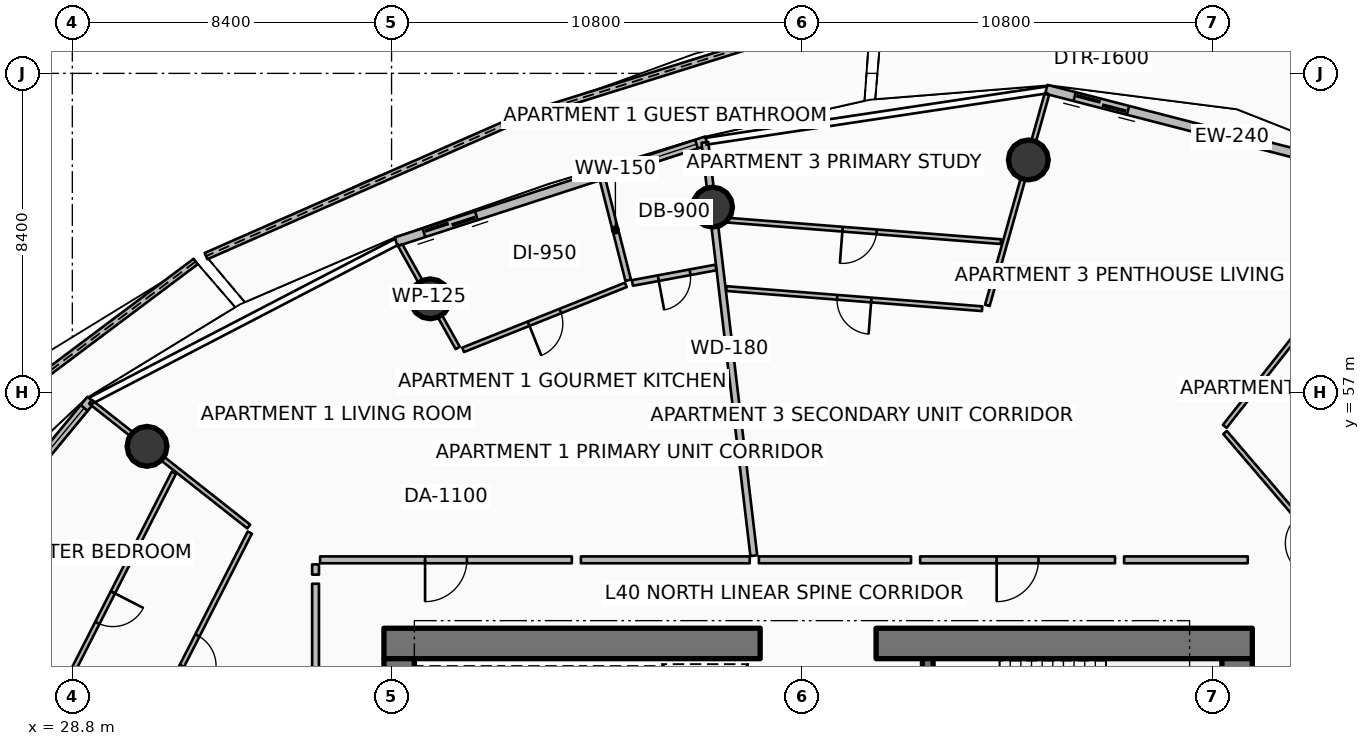
"""IFC4 building model, lengths in metres.
Left out: names, types, materials, properties, quantities, classifications, styles, units other than length and angle.
Written with IfcOpenShell. Run it as: python <this file> out.ifc"""

import sys

from ifc_helpers import new_model, si_unit, direction, frame, frame_2d, origin, origin_2d, place, context, subcontext, project, spatial, polyline, rectangle, circle, outline, extrude, element, fill, save


model = new_model("IFC4")
c1 = context("Model", 3, precision=1e-05, world=origin(), true_north=direction((0.0, 1.0)))
c2 = subcontext(c1, "Body", "Model", "MODEL_VIEW")
j1 = project(units=[si_unit("LENGTHUNIT", "METRE"), si_unit("PLANEANGLEUNIT", "RADIAN")], contexts=[c1])
p1 = place(None, origin())
s1 = spatial("IfcSite", under=j1, at=p1, CompositionType="ELEMENT")
p2 = place(p1, origin())
s2 = spatial("IfcBuilding", under=s1, at=p2, CompositionType="ELEMENT")
p3 = place(p2, frame((0.0, 0.0, 161.55)))
s3 = spatial("IfcBuildingStorey", under=s2, at=p3, CompositionType="ELEMENT", Elevation=161.55)
p4 = place(p3, frame((37.0, 50.4, 0.0), z_axis=(0.0, 0.0, 1.0), x_axis=(1.0, 0.0, 0.0)))
e1 = element("IfcWall", 1, at=p4, inside=s3, PredefinedType="SHEAR", context=c2, shape_type="SweptSolid", body=[
    extrude(rectangle(XDim=9.9, YDim=0.8, at=frame_2d((4.95, 0.0))), origin(), (0.0, 0.0, 1.0), 3.75),
])
p5 = place(p3, frame((49.95, 50.4, 0.0), z_axis=(0.0, 0.0, 1.0), x_axis=(1.0, 0.0, 0.0)))
e2 = element("IfcWall", 2, at=p5, inside=s3, PredefinedType="SHEAR", context=c2, shape_type="SweptSolid", body=[
    extrude(rectangle(XDim=9.9, YDim=0.8, at=frame_2d((4.95, 0.0))), origin(), (0.0, 0.0, 1.0), 3.75),
])
for number, where, z_axis, x_axis in (
    (3, (37.4, 34.0, 0.0), (0.0, 0.0, 1.0), (0.0, 1.0, 0.0)),
    (4, (59.45, 34.0, 0.0), (0.0, 0.0, 1.0), (0.0, 1.0, 0.0)),
):
    element("IfcWall", number, at=place(p3, frame(where, z_axis=z_axis, x_axis=x_axis)), inside=s3, PredefinedType="SHEAR", context=c2, shape_type="SweptSolid", body=[
        extrude(rectangle(XDim=16.0, YDim=0.8, at=frame_2d((8.0, 0.0))), origin(), (0.0, 0.0, 1.0), 3.75),
    ])
p6 = place(p3, frame((51.31, 46.5, 0.0), z_axis=(0.0, 0.0, 1.0), x_axis=(0.0, 1.0, 0.0)))
e5 = element("IfcWall", 5, at=p6, inside=s3, PredefinedType="SHEAR", context=c2, shape_type="SweptSolid", body=[
    extrude(rectangle(XDim=3.5, YDim=0.28, at=frame_2d((1.75, 0.0))), origin(), (0.0, 0.0, 1.0), 3.75),
])
for number, where, z_axis, x_axis in (
    (6, (53.957, 63.122, 0.0), (0.0, 0.0, 1.0), (1.0, 0.0, 0.0)),
    (7, (45.647, 61.881, 0.0), (0.0, 0.0, 1.0), (1.0, 0.0, 0.0)),
    (8, (38.218, 59.467, 0.0), (0.0, 0.0, 1.0), (1.0, 0.0, 0.0)),
    (9, (30.766, 55.586, 0.0), (0.0, 0.0, 1.0), (1.0, 0.0, 0.0)),
):
    element("IfcColumn", number, at=place(p3, frame(where, z_axis=z_axis, x_axis=x_axis)), inside=s3, PredefinedType="COLUMN", context=c2, shape_type="SweptSolid", body=[
        extrude(circle(Radius=0.525, at=origin_2d()), origin(), (0.0, 0.0, 1.0), 3.5),
    ])
p7 = place(p3, frame((69.904, 60.94, 0.0), z_axis=(0.0, 0.0, 1.0), x_axis=(-0.847688171498, 0.53049482929, 0.0)))
e10 = element("IfcWall", 10, at=p7, inside=s3, PredefinedType="PARAPET", context=c2, shape_type="SweptSolid", body=[
    extrude(outline(polyline([(0.0, 0.0), (10.84, 0.0), (10.84, 1.832), (5.42, 1.696), (0.0, 1.497), (0.0, 0.0)])), frame((0.0, 0.09, 0.0), z_axis=(0.0, -1.0, 0.0), x_axis=(1.0, 0.0, 0.0)), (0.0, 0.0, 1.0), 0.18),
])
p8 = place(p3, frame((49.824, 67.137, 0.0), z_axis=(0.0, 0.0, 1.0), x_axis=(-0.954421625817, -0.298461656119, 0.0)))
e11 = element("IfcWall", 11, at=p8, inside=s3, PredefinedType="PARAPET", context=c2, shape_type="SweptSolid", body=[
    extrude(outline(polyline([(0.0, 0.0), (9.383, 0.0), (9.383, 1.348), (4.691, 1.562), (0.0, 1.747), (0.0, 0.0)])), frame((0.0, 0.09, 0.0), z_axis=(0.0, -1.0, 0.0), x_axis=(1.0, 0.0, 0.0)), (0.0, 0.0, 1.0), 0.18),
])
p9 = place(p3, frame((40.644, 64.253, 0.0), z_axis=(0.0, 0.0, 1.0), x_axis=(-0.915409194146, -0.402524542448, 0.0)))
e12 = element("IfcWall", 12, at=p9, inside=s3, PredefinedType="PARAPET", context=c2, shape_type="SweptSolid", body=[
    extrude(outline(polyline([(0.0, 0.0), (9.097, 0.0), (9.097, 1.12), (4.548, 1.182), (0.0, 1.348), (0.0, 0.0)])), frame((0.0, 0.09, 0.0), z_axis=(0.0, -1.0, 0.0), x_axis=(1.0, 0.0, 0.0)), (0.0, 0.0, 1.0), 0.18),
])
p10 = place(p3, frame((32.046, 60.45, 0.0), z_axis=(0.0, 0.0, 1.0), x_axis=(-0.800078127259, -0.599895816189, 0.0)))
e13 = element("IfcWall", 13, at=p10, inside=s3, PredefinedType="PARAPET", context=c2, shape_type="SweptSolid", body=[
    extrude(outline(polyline([(0.0, 0.0), (10.124, 0.0), (10.124, 1.348), (5.062, 1.182), (0.0, 1.12), (0.0, 0.0)])), frame((0.0, 0.09, 0.0), z_axis=(0.0, -1.0, 0.0), x_axis=(1.0, 0.0, 0.0)), (0.0, 0.0, 1.0), 0.18),
])
p11 = place(p3, frame((64.192, 62.466, 0.0), z_axis=(0.0, 0.0, 1.0), x_axis=(-0.968379685126, 0.249481032214, 0.0)))
e14 = element("IfcWall", 14, at=p11, inside=s3, PredefinedType="SOLIDWALL", context=c2, shape_type="SweptSolid", body=[
    extrude(rectangle(XDim=10.082, YDim=0.24, at=frame_2d((5.041, 0.0))), origin(), (0.0, 0.0, 1.0), 2.45),
])
p12 = place(p11, frame((7.862, 0.0, 0.0)))
e15 = element("IfcOpeningElement", 15, at=p12, cuts=e14, PredefinedType="OPENING", context=c2, shape_type="SweptSolid", body=[
    extrude(rectangle(XDim=1.45, YDim=2.15, at=frame_2d((0.725, 1.075))), frame((0.0, 0.13, 0.0), z_axis=(0.0, -1.0, 0.0), x_axis=(1.0, 0.0, 0.0)), (0.0, 0.0, 1.0), 0.26),
])
p13 = place(p11, frame((0.28, 0.0, 0.65)))
e16 = element("IfcOpeningElement", 16, at=p13, cuts=e14, PredefinedType="OPENING", context=c2, shape_type="SweptSolid", body=[
    extrude(rectangle(XDim=1.6, YDim=1.5, at=frame_2d((0.8, 0.75))), frame((0.0, 0.13, 0.0), z_axis=(0.0, -1.0, 0.0), x_axis=(1.0, 0.0, 0.0)), (0.0, 0.0, 1.0), 0.26),
])
p14 = place(p3, frame((45.49, 63.624, 0.0), z_axis=(0.0, 0.0, 1.0), x_axis=(-0.951046390632, -0.309048156224, 0.0)))
e17 = element("IfcWall", 17, at=p14, inside=s3, PredefinedType="SOLIDWALL", context=c2, shape_type="SweptSolid", body=[
    extrude(rectangle(XDim=8.59, YDim=0.24, at=frame_2d((4.295, 0.0))), origin(), (0.0, 0.0, 1.0), 2.45),
])
p15 = place(p14, frame((6.37, 0.0, 0.0)))
e18 = element("IfcOpeningElement", 18, at=p15, cuts=e17, PredefinedType="OPENING", context=c2, shape_type="SweptSolid", body=[
    extrude(rectangle(XDim=1.45, YDim=2.15, at=frame_2d((0.725, 1.075))), frame((0.0, 0.13, 0.0), z_axis=(0.0, -1.0, 0.0), x_axis=(1.0, 0.0, 0.0)), (0.0, 0.0, 1.0), 0.26),
])
p16 = place(p14, frame((0.28, 0.0, 0.65)))
e19 = element("IfcOpeningElement", 19, at=p16, cuts=e17, PredefinedType="OPENING", context=c2, shape_type="SweptSolid", body=[
    extrude(rectangle(XDim=1.6, YDim=1.5, at=frame_2d((0.8, 0.75))), frame((0.0, 0.13, 0.0), z_axis=(0.0, -1.0, 0.0), x_axis=(1.0, 0.0, 0.0)), (0.0, 0.0, 1.0), 0.26),
])
p17 = place(p3, frame((29.291, 56.813, 0.0), z_axis=(0.0, 0.0, 1.0), x_axis=(-0.636771922292, -0.77105221547, 0.0)))
e20 = element("IfcWall", 20, at=p17, inside=s3, PredefinedType="SOLIDWALL", context=c2, shape_type="SweptSolid", body=[
    extrude(rectangle(XDim=10.082, YDim=0.24, at=frame_2d((5.041, 0.0))), origin(), (0.0, 0.0, 1.0), 2.45),
])
p18 = place(p17, frame((7.862, 0.0, 0.0)))
e21 = element("IfcOpeningElement", 21, at=p18, cuts=e20, PredefinedType="OPENING", context=c2, shape_type="SweptSolid", body=[
    extrude(rectangle(XDim=1.45, YDim=2.15, at=frame_2d((0.725, 1.075))), frame((0.0, 0.13, 0.0), z_axis=(0.0, -1.0, 0.0), x_axis=(1.0, 0.0, 0.0)), (0.0, 0.0, 1.0), 0.26),
])
p19 = place(p17, frame((0.28, 0.0, 0.65)))
e22 = element("IfcOpeningElement", 22, at=p19, cuts=e20, PredefinedType="OPENING", context=c2, shape_type="SweptSolid", body=[
    extrude(rectangle(XDim=1.6, YDim=1.5, at=frame_2d((0.8, 0.75))), frame((0.0, 0.13, 0.0), z_axis=(0.0, -1.0, 0.0), x_axis=(1.0, 0.0, 0.0)), (0.0, 0.0, 1.0), 0.26),
])
p20 = place(p3, frame((46.732, 52.709, 0.0), z_axis=(0.0, 0.0, 1.0), x_axis=(-0.117537145285, 0.993068486802, 0.0)))
e23 = element("IfcWall", 23, at=p20, inside=s3, PredefinedType="PARTITIONING", context=c2, shape_type="SweptSolid", body=[
    extrude(rectangle(XDim=10.951, YDim=0.18, at=frame_2d((5.475, 0.0))), origin(), (0.0, 0.0, 1.0), 2.94),
])
p21 = place(p3, frame((41.944, 52.6, 0.0), z_axis=(0.0, 0.0, 1.0), x_axis=(-1.0, 0.0, 0.0)))
e24 = element("IfcWall", 24, at=p21, inside=s3, PredefinedType="PARTITIONING", context=c2, shape_type="SweptSolid", body=[
    extrude(rectangle(XDim=6.624, YDim=0.18, at=frame_2d((3.312, 0.0))), origin(), (0.0, 0.0, 1.0), 2.94),
])
p22 = place(p21, frame((2.762, 0.0, 0.0)))
e25 = element("IfcOpeningElement", 25, at=p22, cuts=e24, PredefinedType="OPENING", context=c2, shape_type="SweptSolid", body=[
    extrude(rectangle(XDim=1.1, YDim=2.1, at=frame_2d((0.55, 1.05))), frame((0.0, 0.1, 0.0), z_axis=(0.0, -1.0, 0.0), x_axis=(1.0, 0.0, 0.0)), (0.0, 0.0, 1.0), 0.2),
])
p23 = place(p3, frame((35.2, 52.48, 0.0), z_axis=(0.0, 0.0, 1.0), x_axis=(0.0, -1.0, 0.0)))
e26 = element("IfcWall", 26, at=p23, inside=s3, PredefinedType="PARTITIONING", context=c2, shape_type="SweptSolid", body=[
    extrude(rectangle(XDim=0.269, YDim=0.18, at=frame_2d((0.135, 0.0))), origin(), (0.0, 0.0, 1.0), 2.94),
])
p24 = place(p3, frame((46.625, 52.6, 0.0), z_axis=(0.0, 0.0, 1.0), x_axis=(-1.0, 0.0, 0.0)))
e27 = element("IfcWall", 27, at=p24, inside=s3, PredefinedType="PARTITIONING", context=c2, shape_type="SweptSolid", body=[
    extrude(rectangle(XDim=4.442, YDim=0.18, at=frame_2d((2.221, 0.0))), origin(), (0.0, 0.0, 1.0), 2.94),
])
p25 = place(p3, frame((38.941, 58.175, 0.0), z_axis=(0.0, 0.0, 1.0), x_axis=(-0.488620181058, 0.872496600946, 0.0)))
e28 = element("IfcWall", 28, at=p25, inside=s3, PredefinedType="PARTITIONING", context=c2, shape_type="SweptSolid", body=[
    extrude(rectangle(XDim=3.095, YDim=0.125, at=frame_2d((1.548, 0.0))), origin(), (0.0, 0.0, 1.0), 2.94),
])
p26 = place(p3, frame((45.734, 60.293, 0.0), z_axis=(0.0, 0.0, 1.0), x_axis=(-0.983182569162, -0.182625397184, 0.0)))
e29 = element("IfcWall", 29, at=p26, inside=s3, PredefinedType="PARTITIONING", context=c2, shape_type="SweptSolid", body=[
    extrude(rectangle(XDim=2.234, YDim=0.15, at=frame_2d((1.117, 0.0))), origin(), (0.0, 0.0, 1.0), 2.94),
])
p27 = place(p26, frame((0.692, 0.0, 0.0)))
e30 = element("IfcOpeningElement", 30, at=p27, cuts=e29, PredefinedType="OPENING", context=c2, shape_type="SweptSolid", body=[
    extrude(rectangle(XDim=0.85, YDim=2.06, at=frame_2d((0.425, 1.03))), frame((0.0, 0.085, 0.0), z_axis=(0.0, -1.0, 0.0), x_axis=(1.0, 0.0, 0.0)), (0.0, 0.0, 1.0), 0.17),
])
p28 = place(p3, frame((43.427, 59.956, 0.0), z_axis=(0.0, 0.0, 1.0), x_axis=(-0.246779972966, 0.969071537578, 0.0)))
e31 = element("IfcWall", 31, at=p28, inside=s3, PredefinedType="PARTITIONING", context=c2, shape_type="SweptSolid", body=[
    extrude(rectangle(XDim=2.732, YDim=0.15, at=frame_2d((1.366, 0.0))), origin(), (0.0, 0.0, 1.0), 2.94),
])
p29 = place(p3, frame((43.366, 59.835, 0.0), z_axis=(0.0, 0.0, 1.0), x_axis=(-0.928691950022, -0.370852075584, 0.0)))
e32 = element("IfcWall", 32, at=p29, inside=s3, PredefinedType="PARTITIONING", context=c2, shape_type="SweptSolid", body=[
    extrude(rectangle(XDim=4.612, YDim=0.125, at=frame_2d((2.306, 0.0))), origin(), (0.0, 0.0, 1.0), 2.94),
])
p30 = place(p29, frame((1.856, 0.0, 0.0)))
e33 = element("IfcOpeningElement", 33, at=p30, cuts=e32, PredefinedType="OPENING", context=c2, shape_type="SweptSolid", body=[
    extrude(rectangle(XDim=0.9, YDim=2.08, at=frame_2d((0.45, 1.04))), frame((0.0, 0.073, 0.0), z_axis=(0.0, -1.0, 0.0), x_axis=(1.0, 0.0, 0.0)), (0.0, 0.0, 1.0), 0.145),
])
p31 = place(p3, frame((35.2, 51.971, 0.0), z_axis=(0.0, 0.0, 1.0), x_axis=(0.0, -1.0, 0.0)))
e34 = element("IfcWall", 34, at=p31, inside=s3, PredefinedType="PARTITIONING", context=c2, shape_type="SweptSolid", body=[
    extrude(rectangle(XDim=6.241, YDim=0.18, at=frame_2d((3.12, 0.0))), origin(), (0.0, 0.0, 1.0), 2.94),
])
p32 = place(p3, frame((33.441, 53.477, 0.0), z_axis=(0.0, 0.0, 1.0), x_axis=(-0.785319981095, 0.619090080112, 0.0)))
e35 = element("IfcWall", 35, at=p32, inside=s3, PredefinedType="PARTITIONING", context=c2, shape_type="SweptSolid", body=[
    extrude(rectangle(XDim=5.301, YDim=0.125, at=frame_2d((2.65, 0.0))), origin(), (0.0, 0.0, 1.0), 2.94),
])
p33 = place(p3, frame((33.469, 53.317, 0.0), z_axis=(0.0, 0.0, 1.0), x_axis=(-0.453977694262, -0.891013048789, 0.0)))
e36 = element("IfcWall", 36, at=p33, inside=s3, PredefinedType="PARTITIONING", context=c2, shape_type="SweptSolid", body=[
    extrude(rectangle(XDim=6.974, YDim=0.125, at=frame_2d((3.487, 0.0))), origin(), (0.0, 0.0, 1.0), 2.94),
])
p34 = place(p33, frame((3.037, 0.0, 0.0)))
e37 = element("IfcOpeningElement", 37, at=p34, cuts=e36, PredefinedType="OPENING", context=c2, shape_type="SweptSolid", body=[
    extrude(rectangle(XDim=0.9, YDim=2.08, at=frame_2d((0.45, 1.04))), frame((0.0, 0.073, 0.0), z_axis=(0.0, -1.0, 0.0), x_axis=(1.0, 0.0, 0.0)), (0.0, 0.0, 1.0), 0.145),
])
p35 = place(p3, frame((31.472, 54.892, 0.0), z_axis=(0.0, 0.0, 1.0), x_axis=(-0.453991424948, -0.89100605277, 0.0)))
e38 = element("IfcWall", 38, at=p35, inside=s3, PredefinedType="PARTITIONING", context=c2, shape_type="SweptSolid", body=[
    extrude(rectangle(XDim=7.967, YDim=0.125, at=frame_2d((3.983, 0.0))), origin(), (0.0, 0.0, 1.0), 2.94),
])
p36 = place(p35, frame((3.534, 0.0, 0.0)))
e39 = element("IfcOpeningElement", 39, at=p36, cuts=e38, PredefinedType="OPENING", context=c2, shape_type="SweptSolid", body=[
    extrude(rectangle(XDim=0.9, YDim=2.08, at=frame_2d((0.45, 1.04))), frame((0.0, 0.073, 0.0), z_axis=(0.0, -1.0, 0.0), x_axis=(1.0, 0.0, 0.0)), (0.0, 0.0, 1.0), 0.145),
])
p37 = place(p3, frame((56.236, 52.6, 0.0), z_axis=(0.0, 0.0, 1.0), x_axis=(-1.0, 0.0, 0.0)))
e40 = element("IfcWall", 40, at=p37, inside=s3, PredefinedType="PARTITIONING", context=c2, shape_type="SweptSolid", body=[
    extrude(rectangle(XDim=5.127, YDim=0.18, at=frame_2d((2.563, 0.0))), origin(), (0.0, 0.0, 1.0), 2.94),
])
p38 = place(p37, frame((2.013, 0.0, 0.0)))
e41 = element("IfcOpeningElement", 41, at=p38, cuts=e40, PredefinedType="OPENING", context=c2, shape_type="SweptSolid", body=[
    extrude(rectangle(XDim=1.1, YDim=2.1, at=frame_2d((0.55, 1.05))), frame((0.0, 0.1, 0.0), z_axis=(0.0, -1.0, 0.0), x_axis=(1.0, 0.0, 0.0)), (0.0, 0.0, 1.0), 0.2),
])
p39 = place(p3, frame((59.73, 52.6, 0.0), z_axis=(0.0, 0.0, 1.0), x_axis=(-1.0, 0.0, 0.0)))
e42 = element("IfcWall", 42, at=p39, inside=s3, PredefinedType="PARTITIONING", context=c2, shape_type="SweptSolid", body=[
    extrude(rectangle(XDim=3.254, YDim=0.18, at=frame_2d((1.627, 0.0))), origin(), (0.0, 0.0, 1.0), 2.94),
])
p40 = place(p3, frame((59.125, 56.112, 0.0), z_axis=(0.0, 0.0, 1.0), x_axis=(0.61910151414, 0.78531096719, 0.0)))
e43 = element("IfcWall", 43, at=p40, inside=s3, PredefinedType="PARTITIONING", context=c2, shape_type="SweptSolid", body=[
    extrude(rectangle(XDim=8.082, YDim=0.125, at=frame_2d((4.041, 0.0))), origin(), (0.0, 0.0, 1.0), 2.94),
])
p41 = place(p3, frame((63.52, 50.815, 0.0), z_axis=(0.0, 0.0, 1.0), x_axis=(-0.649447526186, 0.760406411553, 0.0)))
e44 = element("IfcWall", 44, at=p41, inside=s3, PredefinedType="PARTITIONING", context=c2, shape_type="SweptSolid", body=[
    extrude(rectangle(XDim=6.753, YDim=0.125, at=frame_2d((3.376, 0.0))), origin(), (0.0, 0.0, 1.0), 2.94),
])
p42 = place(p41, frame((2.926, 0.0, 0.0)))
e45 = element("IfcOpeningElement", 45, at=p42, cuts=e44, PredefinedType="OPENING", context=c2, shape_type="SweptSolid", body=[
    extrude(rectangle(XDim=0.9, YDim=2.08, at=frame_2d((0.45, 1.04))), frame((0.0, 0.073, 0.0), z_axis=(0.0, -1.0, 0.0), x_axis=(1.0, 0.0, 0.0)), (0.0, 0.0, 1.0), 0.145),
])
p43 = place(p3, frame((50.869, 52.6, 0.0), z_axis=(0.0, 0.0, 1.0), x_axis=(-1.0, 0.0, 0.0)))
e46 = element("IfcWall", 46, at=p43, inside=s3, PredefinedType="PARTITIONING", context=c2, shape_type="SweptSolid", body=[
    extrude(rectangle(XDim=4.004, YDim=0.18, at=frame_2d((2.002, 0.0))), origin(), (0.0, 0.0, 1.0), 2.94),
])
p44 = place(p3, frame((52.878, 59.295, 0.0), z_axis=(0.0, 0.0, 1.0), x_axis=(0.271461170106, 0.962449392501, 0.0)))
e47 = element("IfcWall", 47, at=p44, inside=s3, PredefinedType="PARTITIONING", context=c2, shape_type="SweptSolid", body=[
    extrude(rectangle(XDim=5.769, YDim=0.125, at=frame_2d((2.885, 0.0))), origin(), (0.0, 0.0, 1.0), 2.94),
])
p45 = place(p3, frame((52.741, 59.208, 0.0), z_axis=(0.0, 0.0, 1.0), x_axis=(-0.996917452966, 0.078457580711, 0.0)))
e48 = element("IfcWall", 48, at=p45, inside=s3, PredefinedType="PARTITIONING", context=c2, shape_type="SweptSolid", body=[
    extrude(rectangle(XDim=6.752, YDim=0.125, at=frame_2d((3.376, 0.0))), origin(), (0.0, 0.0, 1.0), 2.94),
])
p46 = place(p45, frame((2.926, 0.0, 0.0)))
e49 = element("IfcOpeningElement", 49, at=p46, cuts=e48, PredefinedType="OPENING", context=c2, shape_type="SweptSolid", body=[
    extrude(rectangle(XDim=0.9, YDim=2.08, at=frame_2d((0.45, 1.04))), frame((0.0, 0.073, 0.0), z_axis=(0.0, -1.0, 0.0), x_axis=(1.0, 0.0, 0.0)), (0.0, 0.0, 1.0), 0.145),
])
p47 = place(p3, frame((53.239, 60.972, 0.0), z_axis=(0.0, 0.0, 1.0), x_axis=(-0.996916953075, 0.078463932292, 0.0)))
e50 = element("IfcWall", 50, at=p47, inside=s3, PredefinedType="PARTITIONING", context=c2, shape_type="SweptSolid", body=[
    extrude(rectangle(XDim=7.468, YDim=0.125, at=frame_2d((3.734, 0.0))), origin(), (0.0, 0.0, 1.0), 2.94),
])
p48 = place(p47, frame((3.284, 0.0, 0.0)))
e51 = element("IfcOpeningElement", 51, at=p48, cuts=e50, PredefinedType="OPENING", context=c2, shape_type="SweptSolid", body=[
    extrude(rectangle(XDim=0.9, YDim=2.08, at=frame_2d((0.45, 1.04))), frame((0.0, 0.073, 0.0), z_axis=(0.0, -1.0, 0.0), x_axis=(1.0, 0.0, 0.0)), (0.0, 0.0, 1.0), 0.145),
])
p49 = place(p12, origin())
e52 = element("IfcDoor", 52, at=p49, inside=s3, OperationType="DOUBLE_DOOR_SLIDING", PredefinedType="DOOR", context=c2, shape_type="SweptSolid", body=[
    extrude(rectangle(XDim=1.45, YDim=2.15, at=frame_2d((0.725, 1.075))), frame((0.0, 0.025, 0.0), z_axis=(0.0, -1.0, 0.0), x_axis=(1.0, 0.0, 0.0)), (0.0, 0.0, 1.0), 0.05),
])
fill(e15, e52)
p50 = place(p15, origin())
e53 = element("IfcDoor", 53, at=p50, inside=s3, OperationType="DOUBLE_DOOR_SLIDING", PredefinedType="DOOR", context=c2, shape_type="SweptSolid", body=[
    extrude(rectangle(XDim=1.45, YDim=2.15, at=frame_2d((0.725, 1.075))), frame((0.0, 0.025, 0.0), z_axis=(0.0, -1.0, 0.0), x_axis=(1.0, 0.0, 0.0)), (0.0, 0.0, 1.0), 0.05),
])
fill(e18, e53)
p51 = place(p16, origin())
e54 = element("IfcWindow", 54, at=p51, inside=s3, PartitioningType="SINGLE_PANEL", PredefinedType="WINDOW", context=c2, shape_type="SweptSolid", body=[
    extrude(rectangle(XDim=1.6, YDim=1.5, at=frame_2d((0.8, 0.75))), frame((0.0, 0.03, 0.0), z_axis=(0.0, -1.0, 0.0), x_axis=(1.0, 0.0, 0.0)), (0.0, 0.0, 1.0), 0.06),
])
fill(e19, e54)
p52 = place(p19, origin())
e55 = element("IfcWindow", 55, at=p52, inside=s3, PartitioningType="SINGLE_PANEL", PredefinedType="WINDOW", context=c2, shape_type="SweptSolid", body=[
    extrude(rectangle(XDim=1.6, YDim=1.5, at=frame_2d((0.8, 0.75))), frame((0.0, 0.03, 0.0), z_axis=(0.0, -1.0, 0.0), x_axis=(1.0, 0.0, 0.0)), (0.0, 0.0, 1.0), 0.06),
])
fill(e22, e55)
p53 = place(p22, origin())
e56 = element("IfcDoor", 56, at=p53, inside=s3, OperationType="SINGLE_SWING_RIGHT", PredefinedType="DOOR", context=c2, shape_type="SweptSolid", body=[
    extrude(rectangle(XDim=1.1, YDim=2.1, at=frame_2d((0.55, 1.05))), frame((0.0, 0.025, 0.0), z_axis=(0.0, -1.0, 0.0), x_axis=(1.0, 0.0, 0.0)), (0.0, 0.0, 1.0), 0.05),
])
fill(e25, e56)
p54 = place(p27, origin())
e57 = element("IfcDoor", 57, at=p54, inside=s3, OperationType="SINGLE_SWING_RIGHT", PredefinedType="DOOR", context=c2, shape_type="SweptSolid", body=[
    extrude(rectangle(XDim=0.85, YDim=2.06, at=frame_2d((0.425, 1.03))), frame((0.0, 0.025, 0.0), z_axis=(0.0, -1.0, 0.0), x_axis=(1.0, 0.0, 0.0)), (0.0, 0.0, 1.0), 0.05),
])
fill(e30, e57)
p55 = place(p30, origin())
e58 = element("IfcDoor", 58, at=p55, inside=s3, OperationType="SINGLE_SWING_RIGHT", PredefinedType="DOOR", context=c2, shape_type="SweptSolid", body=[
    extrude(rectangle(XDim=0.9, YDim=2.08, at=frame_2d((0.45, 1.04))), frame((0.0, 0.025, 0.0), z_axis=(0.0, -1.0, 0.0), x_axis=(1.0, 0.0, 0.0)), (0.0, 0.0, 1.0), 0.05),
])
fill(e33, e58)
p56 = place(p34, origin())
e59 = element("IfcDoor", 59, at=p56, inside=s3, OperationType="SINGLE_SWING_RIGHT", PredefinedType="DOOR", context=c2, shape_type="SweptSolid", body=[
    extrude(rectangle(XDim=0.9, YDim=2.08, at=frame_2d((0.45, 1.04))), frame((0.0, 0.025, 0.0), z_axis=(0.0, -1.0, 0.0), x_axis=(1.0, 0.0, 0.0)), (0.0, 0.0, 1.0), 0.05),
])
fill(e37, e59)
p57 = place(p36, origin())
e60 = element("IfcDoor", 60, at=p57, inside=s3, OperationType="SINGLE_SWING_LEFT", PredefinedType="DOOR", context=c2, shape_type="SweptSolid", body=[
    extrude(rectangle(XDim=0.9, YDim=2.08, at=frame_2d((0.45, 1.04))), frame((0.0, 0.025, 0.0), z_axis=(0.0, -1.0, 0.0), x_axis=(1.0, 0.0, 0.0)), (0.0, 0.0, 1.0), 0.05),
])
fill(e39, e60)
p58 = place(p38, origin())
e61 = element("IfcDoor", 61, at=p58, inside=s3, OperationType="SINGLE_SWING_RIGHT", PredefinedType="DOOR", context=c2, shape_type="SweptSolid", body=[
    extrude(rectangle(XDim=1.1, YDim=2.1, at=frame_2d((0.55, 1.05))), frame((0.0, 0.025, 0.0), z_axis=(0.0, -1.0, 0.0), x_axis=(1.0, 0.0, 0.0)), (0.0, 0.0, 1.0), 0.05),
])
fill(e41, e61)
p59 = place(p46, origin())
e62 = element("IfcDoor", 62, at=p59, inside=s3, OperationType="SINGLE_SWING_LEFT", PredefinedType="DOOR", context=c2, shape_type="SweptSolid", body=[
    extrude(rectangle(XDim=0.9, YDim=2.08, at=frame_2d((0.45, 1.04))), frame((0.0, 0.025, 0.0), z_axis=(0.0, -1.0, 0.0), x_axis=(1.0, 0.0, 0.0)), (0.0, 0.0, 1.0), 0.05),
])
fill(e49, e62)
p60 = place(p48, origin())
e63 = element("IfcDoor", 63, at=p60, inside=s3, OperationType="SINGLE_SWING_RIGHT", PredefinedType="DOOR", context=c2, shape_type="SweptSolid", body=[
    extrude(rectangle(XDim=0.9, YDim=2.08, at=frame_2d((0.45, 1.04))), frame((0.0, 0.025, 0.0), z_axis=(0.0, -1.0, 0.0), x_axis=(1.0, 0.0, 0.0)), (0.0, 0.0, 1.0), 0.05),
])
fill(e51, e63)
save(model, sys.argv[1])
